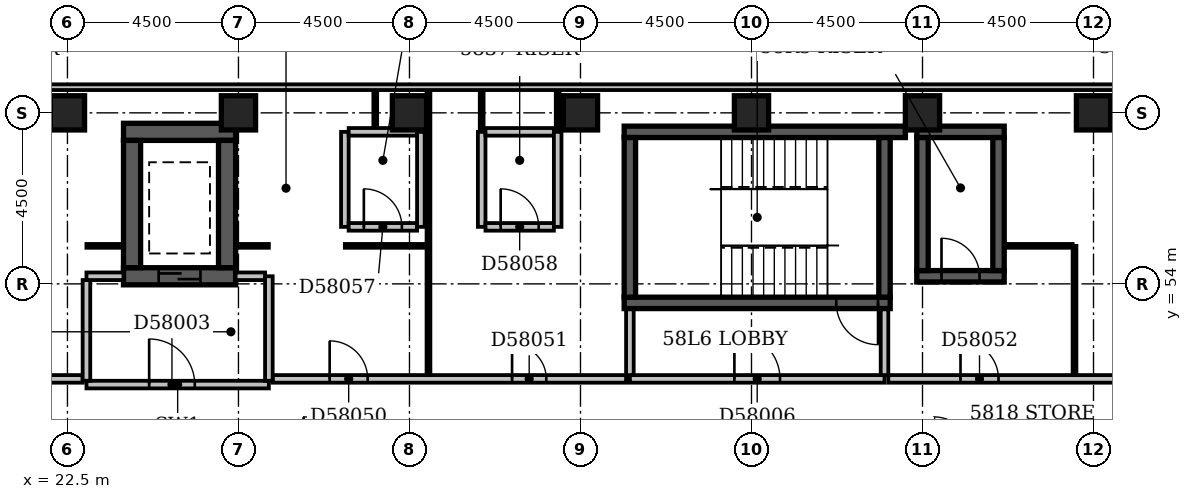
"""IFC4 building model, lengths in metres.
Left out: names, types, materials, properties, quantities, classifications, styles, units other than length and angle.
Written with IfcOpenShell. Run it as: python <this file> out.ifc"""

import sys

from ifc_helpers import new_model, si_unit, direction, frame, frame_2d, origin, origin_2d, place, context, subcontext, project, spatial, rectangle, extrude, element, fill, save


model = new_model("IFC4")
c1 = context("Model", 3, precision=1e-05, world=origin(), true_north=direction((0.0, 1.0)))
c2 = subcontext(c1, "Body", "Model", "MODEL_VIEW")
j1 = project(units=[si_unit("LENGTHUNIT", "METRE"), si_unit("PLANEANGLEUNIT", "RADIAN")], contexts=[c1])
p1 = place(None, origin())
s1 = spatial("IfcSite", under=j1, at=p1, CompositionType="ELEMENT")
p2 = place(p1, origin())
s2 = spatial("IfcBuilding", under=s1, at=p2, CompositionType="ELEMENT")
p3 = place(p2, frame((0.0, 0.0, 225.8)))
s3 = spatial("IfcBuildingStorey", under=s2, at=p3, CompositionType="ELEMENT", Elevation=225.8)
p4 = place(p3, frame((23.975, 54.2, -0.3), z_axis=(0.0, 0.0, 1.0), x_axis=(1.0, 0.0, 0.0)))
e1 = element("IfcWall", 1, at=p4, inside=s3, PredefinedType="SHEAR", context=c2, shape_type="SweptSolid", body=[
    extrude(rectangle(XDim=2.95, YDim=0.45, at=frame_2d((1.475, 0.0))), origin(), (0.0, 0.0, 1.0), 3.6),
])
p5 = place(p4, frame((0.925, 0.0, 0.3)))
e2 = element("IfcOpeningElement", 2, at=p5, cuts=e1, PredefinedType="OPENING", context=c2, shape_type="SweptSolid", body=[
    extrude(rectangle(XDim=1.1, YDim=2.1, at=frame_2d((0.55, 1.05))), frame((0.0, 0.237, 0.0), z_axis=(0.0, -1.0, 0.0), x_axis=(1.0, 0.0, 0.0)), (0.0, 0.0, 1.0), 0.474),
])
p6 = place(p3, frame((23.975, 58.0, -0.3), z_axis=(0.0, 0.0, 1.0), x_axis=(1.0, 0.0, 0.0)))
e3 = element("IfcWall", 3, at=p6, inside=s3, PredefinedType="SHEAR", context=c2, shape_type="SweptSolid", body=[
    extrude(rectangle(XDim=2.95, YDim=0.45, at=frame_2d((1.475, 0.0))), origin(), (0.0, 0.0, 1.0), 3.6),
])
for number, where, z_axis, x_axis in (
    (4, (24.2, 54.425, -0.3), (0.0, 0.0, 1.0), (0.0, 1.0, 0.0)),
    (5, (26.7, 54.425, -0.3), (0.0, 0.0, 1.0), (0.0, 1.0, 0.0)),
):
    element("IfcWall", number, at=place(p3, frame(where, z_axis=z_axis, x_axis=x_axis)), inside=s3, PredefinedType="SHEAR", context=c2, shape_type="SweptSolid", body=[
        extrude(rectangle(XDim=3.35, YDim=0.45, at=frame_2d((1.675, 0.0))), origin(), (0.0, 0.0, 1.0), 3.6),
    ])
p7 = place(p3, frame((37.15, 53.5, -0.3), z_axis=(0.0, 0.0, 1.0), x_axis=(1.0, 0.0, 0.0)))
e6 = element("IfcWall", 6, at=p7, inside=s3, PredefinedType="SHEAR", context=c2, shape_type="SweptSolid", body=[
    extrude(rectangle(XDim=7.0, YDim=0.3, at=frame_2d((3.5, 0.0))), origin(), (0.0, 0.0, 1.0), 3.6),
])
p8 = place(p7, frame((5.58, 0.0, 0.3)))
e7 = element("IfcOpeningElement", 7, at=p8, cuts=e6, PredefinedType="OPENING", context=c2, shape_type="SweptSolid", body=[
    extrude(rectangle(XDim=1.1, YDim=2.1, at=frame_2d((0.55, 1.05))), frame((0.0, 0.162, 0.0), z_axis=(0.0, -1.0, 0.0), x_axis=(1.0, 0.0, 0.0)), (0.0, 0.0, 1.0), 0.324),
])
p9 = place(p3, frame((37.15, 58.0, -0.3), z_axis=(0.0, 0.0, 1.0), x_axis=(1.0, 0.0, 0.0)))
e8 = element("IfcWall", 8, at=p9, inside=s3, PredefinedType="SHEAR", context=c2, shape_type="SweptSolid", body=[
    extrude(rectangle(XDim=7.4, YDim=0.3, at=frame_2d((3.7, 0.0))), origin(), (0.0, 0.0, 1.0), 3.6),
])
for number, where, z_axis, x_axis in (
    (9, (37.3, 53.65, -0.3), (0.0, 0.0, 1.0), (0.0, 1.0, 0.0)),
    (10, (44.0, 53.65, -0.3), (0.0, 0.0, 1.0), (0.0, 1.0, 0.0)),
):
    element("IfcWall", number, at=place(p3, frame(where, z_axis=z_axis, x_axis=x_axis)), inside=s3, PredefinedType="SHEAR", context=c2, shape_type="SweptSolid", body=[
        extrude(rectangle(XDim=4.2, YDim=0.3, at=frame_2d((2.1, 0.0))), origin(), (0.0, 0.0, 1.0), 3.6),
    ])
p10 = place(p3, frame((44.85, 54.2, -0.3), z_axis=(0.0, 0.0, 1.0), x_axis=(1.0, 0.0, 0.0)))
e11 = element("IfcWall", 11, at=p10, inside=s3, PredefinedType="SHEAR", context=c2, shape_type="SweptSolid", body=[
    extrude(rectangle(XDim=2.3, YDim=0.3, at=frame_2d((1.15, 0.0))), origin(), (0.0, 0.0, 1.0), 3.6),
])
p11 = place(p10, frame((0.65, 0.0, 0.3)))
e12 = element("IfcOpeningElement", 12, at=p11, cuts=e11, PredefinedType="OPENING", context=c2, shape_type="SweptSolid", body=[
    extrude(rectangle(XDim=1.0, YDim=2.1, at=frame_2d((0.5, 1.05))), frame((0.0, 0.162, 0.0), z_axis=(0.0, -1.0, 0.0), x_axis=(1.0, 0.0, 0.0)), (0.0, 0.0, 1.0), 0.324),
])
p12 = place(p3, frame((44.85, 58.0, -0.3), z_axis=(0.0, 0.0, 1.0), x_axis=(1.0, 0.0, 0.0)))
e13 = element("IfcWall", 13, at=p12, inside=s3, PredefinedType="SHEAR", context=c2, shape_type="SweptSolid", body=[
    extrude(rectangle(XDim=2.3, YDim=0.3, at=frame_2d((1.15, 0.0))), origin(), (0.0, 0.0, 1.0), 3.6),
])
for number, where, z_axis, x_axis in (
    (14, (45.0, 54.35, -0.3), (0.0, 0.0, 1.0), (0.0, 1.0, 0.0)),
    (15, (47.0, 54.35, -0.3), (0.0, 0.0, 1.0), (0.0, 1.0, 0.0)),
):
    element("IfcWall", number, at=place(p3, frame(where, z_axis=z_axis, x_axis=x_axis)), inside=s3, PredefinedType="SHEAR", context=c2, shape_type="SweptSolid", body=[
        extrude(rectangle(XDim=3.5, YDim=0.3, at=frame_2d((1.75, 0.0))), origin(), (0.0, 0.0, 1.0), 3.6),
    ])
for number, where, z_axis, x_axis in (
    (16, (22.5, 58.5, -0.3), (0.0, 0.0, 1.0), (1.0, 0.0, 0.0)),
    (17, (27.0, 58.5, -0.3), (0.0, 0.0, 1.0), (1.0, 0.0, 0.0)),
    (18, (31.5, 58.5, -0.3), (0.0, 0.0, 1.0), (1.0, 0.0, 0.0)),
    (19, (36.0, 58.5, -0.3), (0.0, 0.0, 1.0), (1.0, 0.0, 0.0)),
    (20, (40.5, 58.5, -0.3), (0.0, 0.0, 1.0), (1.0, 0.0, 0.0)),
    (21, (45.0, 58.5, -0.3), (0.0, 0.0, 1.0), (1.0, 0.0, 0.0)),
    (22, (49.5, 58.5, -0.3), (0.0, 0.0, 1.0), (1.0, 0.0, 0.0)),
):
    element("IfcColumn", number, at=place(p3, frame(where, z_axis=z_axis, x_axis=x_axis)), inside=s3, PredefinedType="COLUMN", context=c2, shape_type="SweptSolid", body=[
        extrude(rectangle(XDim=0.9, YDim=0.9, at=origin_2d()), origin(), (0.0, 0.0, 1.0), 3.6),
    ])
p13 = place(p3, frame((50.1, 59.175, 0.0), z_axis=(0.0, 0.0, 1.0), x_axis=(-1.0, 0.0, 0.0)))
e23 = element("IfcWall", 23, at=p13, inside=s3, PredefinedType="STANDARD", context=c2, shape_type="SweptSolid", body=[
    extrude(rectangle(XDim=50.85, YDim=0.15, at=frame_2d((25.425, 0.0))), origin(), (0.0, 0.0, 1.0), 2.7),
])
p14 = place(p3, frame((23.0, 51.35, 0.0), z_axis=(0.0, 0.0, 1.0), x_axis=(1.0, 0.0, 0.0)))
e24 = element("IfcWall", 24, at=p14, inside=s3, PredefinedType="PARTITIONING", context=c2, shape_type="SweptSolid", body=[
    extrude(rectangle(XDim=4.8, YDim=0.2, at=frame_2d((2.4, 0.0))), origin(), (0.0, 0.0, 1.0), 3.3),
])
p15 = place(p14, frame((1.65, 0.0, 0.0)))
e25 = element("IfcOpeningElement", 25, at=p15, cuts=e24, PredefinedType="OPENING", context=c2, shape_type="SweptSolid", body=[
    extrude(rectangle(XDim=1.2, YDim=2.1, at=frame_2d((0.6, 1.05))), frame((0.0, 0.112, 0.0), z_axis=(0.0, -1.0, 0.0), x_axis=(1.0, 0.0, 0.0)), (0.0, 0.0, 1.0), 0.224),
])
p16 = place(p3, frame((27.8, 51.45, 0.0), z_axis=(0.0, 0.0, 1.0), x_axis=(0.0, 1.0, 0.0)))
e26 = element("IfcWall", 26, at=p16, inside=s3, PredefinedType="PARTITIONING", context=c2, shape_type="SweptSolid", body=[
    extrude(rectangle(XDim=2.75, YDim=0.2, at=frame_2d((1.375, 0.0))), origin(), (0.0, 0.0, 1.0), 3.3),
])
p17 = place(p3, frame((23.0, 54.2, 0.0), z_axis=(0.0, 0.0, 1.0), x_axis=(1.0, 0.0, 0.0)))
e27 = element("IfcWall", 27, at=p17, inside=s3, PredefinedType="PARTITIONING", context=c2, shape_type="SweptSolid", body=[
    extrude(rectangle(XDim=0.975, YDim=0.2, at=frame_2d((0.488, 0.0))), origin(), (0.0, 0.0, 1.0), 3.3),
])
p18 = place(p3, frame((26.925, 54.2, 0.0), z_axis=(0.0, 0.0, 1.0), x_axis=(1.0, 0.0, 0.0)))
e28 = element("IfcWall", 28, at=p18, inside=s3, PredefinedType="PARTITIONING", context=c2, shape_type="SweptSolid", body=[
    extrude(rectangle(XDim=0.775, YDim=0.2, at=frame_2d((0.387, 0.0))), origin(), (0.0, 0.0, 1.0), 3.3),
])
p19 = place(p3, frame((23.0, 51.45, 0.0), z_axis=(0.0, 0.0, 1.0), x_axis=(0.0, 1.0, 0.0)))
e29 = element("IfcWall", 29, at=p19, inside=s3, PredefinedType="PARTITIONING", context=c2, shape_type="SweptSolid", body=[
    extrude(rectangle(XDim=2.65, YDim=0.2, at=frame_2d((1.325, 0.0))), origin(), (0.0, 0.0, 1.0), 3.3),
])
p20 = place(p3, frame((37.3, 51.5, 0.0), z_axis=(0.0, 0.0, 1.0), x_axis=(1.0, 0.0, 0.0)))
e30 = element("IfcWall", 30, at=p20, inside=s3, PredefinedType="PARTITIONING", context=c2, shape_type="SweptSolid", body=[
    extrude(rectangle(XDim=6.7, YDim=0.2, at=frame_2d((3.35, 0.0))), origin(), (0.0, 0.0, 1.0), 3.3),
])
p21 = place(p20, frame((2.75, 0.0, 0.0)))
e31 = element("IfcOpeningElement", 31, at=p21, cuts=e30, PredefinedType="OPENING", context=c2, shape_type="SweptSolid", body=[
    extrude(rectangle(XDim=1.2, YDim=2.1, at=frame_2d((0.6, 1.05))), frame((0.0, 0.112, 0.0), z_axis=(0.0, -1.0, 0.0), x_axis=(1.0, 0.0, 0.0)), (0.0, 0.0, 1.0), 0.224),
])
for number, where, z_axis, x_axis in (
    (32, (44.0, 51.6, 0.0), (0.0, 0.0, 1.0), (0.0, 1.0, 0.0)),
    (33, (37.3, 51.6, 0.0), (0.0, 0.0, 1.0), (0.0, 1.0, 0.0)),
):
    element("IfcWall", number, at=place(p3, frame(where, z_axis=z_axis, x_axis=x_axis)), inside=s3, PredefinedType="PARTITIONING", context=c2, shape_type="SweptSolid", body=[
        extrude(rectangle(XDim=1.73, YDim=0.2, at=frame_2d((0.865, 0.0))), origin(), (0.0, 0.0, 1.0), 3.3),
    ])
p22 = place(p3, frame((7.6, 51.5, 0.0), z_axis=(0.0, 0.0, 1.0), x_axis=(1.0, 0.0, 0.0)))
e34 = element("IfcWall", 34, at=p22, inside=s3, PredefinedType="PARTITIONING", context=c2, shape_type="SweptSolid", body=[
    extrude(rectangle(XDim=15.3, YDim=0.2, at=frame_2d((7.65, 0.0))), origin(), (0.0, 0.0, 1.0), 3.3),
])
p23 = place(p22, frame((3.55, 0.0, 0.0)))
e35 = element("IfcOpeningElement", 35, at=p23, cuts=e34, PredefinedType="OPENING", context=c2, shape_type="SweptSolid", body=[
    extrude(rectangle(XDim=0.9, YDim=2.1, at=frame_2d((0.45, 1.05))), frame((0.0, 0.112, 0.0), z_axis=(0.0, -1.0, 0.0), x_axis=(1.0, 0.0, 0.0)), (0.0, 0.0, 1.0), 0.224),
])
p24 = place(p22, frame((11.3, 0.0, 0.0)))
e36 = element("IfcOpeningElement", 36, at=p24, cuts=e34, PredefinedType="OPENING", context=c2, shape_type="SweptSolid", body=[
    extrude(rectangle(XDim=0.9, YDim=2.1, at=frame_2d((0.45, 1.05))), frame((0.0, 0.112, 0.0), z_axis=(0.0, -1.0, 0.0), x_axis=(1.0, 0.0, 0.0)), (0.0, 0.0, 1.0), 0.224),
])
p25 = place(p3, frame((27.9, 51.5, 0.0), z_axis=(0.0, 0.0, 1.0), x_axis=(1.0, 0.0, 0.0)))
e37 = element("IfcWall", 37, at=p25, inside=s3, PredefinedType="PARTITIONING", context=c2, shape_type="SweptSolid", body=[
    extrude(rectangle(XDim=9.3, YDim=0.2, at=frame_2d((4.65, 0.0))), origin(), (0.0, 0.0, 1.0), 3.3),
])
p26 = place(p25, frame((1.5, 0.0, 0.0)))
e38 = element("IfcOpeningElement", 38, at=p26, cuts=e37, PredefinedType="OPENING", context=c2, shape_type="SweptSolid", body=[
    extrude(rectangle(XDim=1.0, YDim=2.1, at=frame_2d((0.5, 1.05))), frame((0.0, 0.112, 0.0), z_axis=(0.0, -1.0, 0.0), x_axis=(1.0, 0.0, 0.0)), (0.0, 0.0, 1.0), 0.224),
])
p27 = place(p25, frame((6.3, 0.0, 0.0)))
e39 = element("IfcOpeningElement", 39, at=p27, cuts=e37, PredefinedType="OPENING", context=c2, shape_type="SweptSolid", body=[
    extrude(rectangle(XDim=0.9, YDim=2.1, at=frame_2d((0.45, 1.05))), frame((0.0, 0.112, 0.0), z_axis=(0.0, -1.0, 0.0), x_axis=(1.0, 0.0, 0.0)), (0.0, 0.0, 1.0), 0.224),
])
p28 = place(p3, frame((44.1, 51.5, 0.0), z_axis=(0.0, 0.0, 1.0), x_axis=(1.0, 0.0, 0.0)))
e40 = element("IfcWall", 40, at=p28, inside=s3, PredefinedType="PARTITIONING", context=c2, shape_type="SweptSolid", body=[
    extrude(rectangle(XDim=10.5, YDim=0.2, at=frame_2d((5.25, 0.0))), origin(), (0.0, 0.0, 1.0), 3.3),
])
p29 = place(p28, frame((1.9, 0.0, 0.0)))
e41 = element("IfcOpeningElement", 41, at=p29, cuts=e40, PredefinedType="OPENING", context=c2, shape_type="SweptSolid", body=[
    extrude(rectangle(XDim=1.0, YDim=2.1, at=frame_2d((0.5, 1.05))), frame((0.0, 0.112, 0.0), z_axis=(0.0, -1.0, 0.0), x_axis=(1.0, 0.0, 0.0)), (0.0, 0.0, 1.0), 0.224),
])
p30 = place(p28, frame((6.9, 0.0, 0.0)))
e42 = element("IfcOpeningElement", 42, at=p30, cuts=e40, PredefinedType="OPENING", context=c2, shape_type="SweptSolid", body=[
    extrude(rectangle(XDim=1.0, YDim=2.1, at=frame_2d((0.5, 1.05))), frame((0.0, 0.112, 0.0), z_axis=(0.0, -1.0, 0.0), x_axis=(1.0, 0.0, 0.0)), (0.0, 0.0, 1.0), 0.224),
])
p31 = place(p3, frame((32.0, 51.6, 0.0), z_axis=(0.0, 0.0, 1.0), x_axis=(0.0, 1.0, 0.0)))
e43 = element("IfcWall", 43, at=p31, inside=s3, PredefinedType="PARTITIONING", context=c2, shape_type="SweptSolid", body=[
    extrude(rectangle(XDim=7.5, YDim=0.1, at=frame_2d((3.75, 0.0))), origin(), (0.0, 0.0, 1.0), 3.3),
])
p32 = place(p3, frame((49.0, 51.6, 0.0), z_axis=(0.0, 0.0, 1.0), x_axis=(0.0, 1.0, 0.0)))
e44 = element("IfcWall", 44, at=p32, inside=s3, PredefinedType="PARTITIONING", context=c2, shape_type="SweptSolid", body=[
    extrude(rectangle(XDim=3.4, YDim=0.1, at=frame_2d((1.7, 0.0))), origin(), (0.0, 0.0, 1.0), 3.3),
])
p33 = place(p3, frame((23.0, 55.0, 0.0), z_axis=(0.0, 0.0, 1.0), x_axis=(1.0, 0.0, 0.0)))
e45 = element("IfcWall", 45, at=p33, inside=s3, PredefinedType="PARTITIONING", context=c2, shape_type="SweptSolid", body=[
    extrude(rectangle(XDim=0.975, YDim=0.1, at=frame_2d((0.488, 0.0))), origin(), (0.0, 0.0, 1.0), 3.3),
])
p34 = place(p3, frame((26.925, 55.0, 0.0), z_axis=(0.0, 0.0, 1.0), x_axis=(1.0, 0.0, 0.0)))
e46 = element("IfcWall", 46, at=p34, inside=s3, PredefinedType="PARTITIONING", context=c2, shape_type="SweptSolid", body=[
    extrude(rectangle(XDim=0.875, YDim=0.1, at=frame_2d((0.438, 0.0))), origin(), (0.0, 0.0, 1.0), 3.3),
])
p35 = place(p3, frame((29.8, 55.0, 0.0), z_axis=(0.0, 0.0, 1.0), x_axis=(1.0, 0.0, 0.0)))
e47 = element("IfcWall", 47, at=p35, inside=s3, PredefinedType="PARTITIONING", context=c2, shape_type="SweptSolid", body=[
    extrude(rectangle(XDim=2.15, YDim=0.1, at=frame_2d((1.075, 0.0))), origin(), (0.0, 0.0, 1.0), 3.3),
])
p36 = place(p3, frame((47.15, 55.0, 0.0), z_axis=(0.0, 0.0, 1.0), x_axis=(1.0, 0.0, 0.0)))
e48 = element("IfcWall", 48, at=p36, inside=s3, PredefinedType="PARTITIONING", context=c2, shape_type="SweptSolid", body=[
    extrude(rectangle(XDim=1.8, YDim=0.1, at=frame_2d((0.9, 0.0))), origin(), (0.0, 0.0, 1.0), 3.3),
])
p37 = place(p3, frame((29.8, 55.5, 0.0), z_axis=(0.0, 0.0, 1.0), x_axis=(0.0, 1.0, 0.0)))
e49 = element("IfcWall", 49, at=p37, inside=s3, PredefinedType="PARTITIONING", context=c2, shape_type="SweptSolid", body=[
    extrude(rectangle(XDim=2.5, YDim=0.2, at=frame_2d((1.25, 0.0))), origin(), (0.0, 0.0, 1.0), 3.3),
])
p38 = place(p3, frame((29.9, 55.5, 0.0), z_axis=(0.0, 0.0, 1.0), x_axis=(1.0, 0.0, 0.0)))
e50 = element("IfcWall", 50, at=p38, inside=s3, PredefinedType="PARTITIONING", context=c2, shape_type="SweptSolid", body=[
    extrude(rectangle(XDim=1.8, YDim=0.2, at=frame_2d((0.9, 0.0))), origin(), (0.0, 0.0, 1.0), 3.3),
])
p39 = place(p38, frame((0.4, 0.0, 0.0)))
e51 = element("IfcOpeningElement", 51, at=p39, cuts=e50, PredefinedType="OPENING", context=c2, shape_type="SweptSolid", body=[
    extrude(rectangle(XDim=1.0, YDim=2.1, at=frame_2d((0.5, 1.05))), frame((0.0, 0.112, 0.0), z_axis=(0.0, -1.0, 0.0), x_axis=(1.0, 0.0, 0.0)), (0.0, 0.0, 1.0), 0.224),
])
for number, where, z_axis, x_axis in (
    (52, (31.8, 55.5, 0.0), (0.0, 0.0, 1.0), (0.0, 1.0, 0.0)),
    (53, (33.4, 55.5, 0.0), (0.0, 0.0, 1.0), (0.0, 1.0, 0.0)),
):
    element("IfcWall", number, at=place(p3, frame(where, z_axis=z_axis, x_axis=x_axis)), inside=s3, PredefinedType="PARTITIONING", context=c2, shape_type="SweptSolid", body=[
        extrude(rectangle(XDim=2.5, YDim=0.2, at=frame_2d((1.25, 0.0))), origin(), (0.0, 0.0, 1.0), 3.3),
    ])
p40 = place(p3, frame((33.5, 55.5, 0.0), z_axis=(0.0, 0.0, 1.0), x_axis=(1.0, 0.0, 0.0)))
e54 = element("IfcWall", 54, at=p40, inside=s3, PredefinedType="PARTITIONING", context=c2, shape_type="SweptSolid", body=[
    extrude(rectangle(XDim=1.8, YDim=0.2, at=frame_2d((0.9, 0.0))), origin(), (0.0, 0.0, 1.0), 3.3),
])
p41 = place(p40, frame((0.4, 0.0, 0.0)))
e55 = element("IfcOpeningElement", 55, at=p41, cuts=e54, PredefinedType="OPENING", context=c2, shape_type="SweptSolid", body=[
    extrude(rectangle(XDim=1.0, YDim=2.1, at=frame_2d((0.5, 1.05))), frame((0.0, 0.112, 0.0), z_axis=(0.0, -1.0, 0.0), x_axis=(1.0, 0.0, 0.0)), (0.0, 0.0, 1.0), 0.224),
])
p42 = place(p3, frame((35.4, 55.5, 0.0), z_axis=(0.0, 0.0, 1.0), x_axis=(0.0, 1.0, 0.0)))
e56 = element("IfcWall", 56, at=p42, inside=s3, PredefinedType="PARTITIONING", context=c2, shape_type="SweptSolid", body=[
    extrude(rectangle(XDim=2.5, YDim=0.2, at=frame_2d((1.25, 0.0))), origin(), (0.0, 0.0, 1.0), 2.4),
])
p43 = place(p3, frame((29.9, 58.0, 0.0), z_axis=(0.0, 0.0, 1.0), x_axis=(1.0, 0.0, 0.0)))
e57 = element("IfcWall", 57, at=p43, inside=s3, PredefinedType="PARTITIONING", context=c2, shape_type="SweptSolid", body=[
    extrude(rectangle(XDim=1.8, YDim=0.2, at=frame_2d((0.9, 0.0))), origin(), (0.0, 0.0, 1.0), 3.3),
])
p44 = place(p3, frame((33.4, 58.0, 0.0), z_axis=(0.0, 0.0, 1.0), x_axis=(0.0, 1.0, 0.0)))
e58 = element("IfcWall", 58, at=p44, inside=s3, PredefinedType="PARTITIONING", context=c2, shape_type="SweptSolid", body=[
    extrude(rectangle(XDim=1.1, YDim=0.1, at=frame_2d((0.55, 0.0))), origin(), (0.0, 0.0, 1.0), 3.3),
])
p45 = place(p3, frame((33.5, 58.0, 0.0), z_axis=(0.0, 0.0, 1.0), x_axis=(1.0, 0.0, 0.0)))
e59 = element("IfcWall", 59, at=p45, inside=s3, PredefinedType="PARTITIONING", context=c2, shape_type="SweptSolid", body=[
    extrude(rectangle(XDim=1.8, YDim=0.2, at=frame_2d((0.9, 0.0))), origin(), (0.0, 0.0, 1.0), 3.3),
])
p46 = place(p3, frame((35.4, 58.0, 0.0), z_axis=(0.0, 0.0, 1.0), x_axis=(0.0, 1.0, 0.0)))
e60 = element("IfcWall", 60, at=p46, inside=s3, PredefinedType="PARTITIONING", context=c2, shape_type="SweptSolid", body=[
    extrude(rectangle(XDim=1.1, YDim=0.1, at=frame_2d((0.55, 0.0))), origin(), (0.0, 0.0, 1.0), 2.4),
])
p47 = place(p3, frame((30.6, 58.1, 0.0), z_axis=(0.0, 0.0, 1.0), x_axis=(0.0, 1.0, 0.0)))
e61 = element("IfcWall", 61, at=p47, inside=s3, PredefinedType="PARTITIONING", context=c2, shape_type="SweptSolid", body=[
    extrude(rectangle(XDim=1.0, YDim=0.1, at=frame_2d((0.5, 0.0))), origin(), (0.0, 0.0, 1.0), 3.3),
])
p48 = place(p15, origin())
e62 = element("IfcDoor", 62, at=p48, inside=s3, OperationType="SINGLE_SWING_LEFT", PredefinedType="DOOR", context=c2, shape_type="SweptSolid", body=[
    extrude(rectangle(XDim=1.2, YDim=2.1, at=frame_2d((0.6, 1.05))), frame((0.0, 0.025, 0.0), z_axis=(0.0, -1.0, 0.0), x_axis=(1.0, 0.0, 0.0)), (0.0, 0.0, 1.0), 0.05),
])
fill(e25, e62)
p49 = place(p5, origin())
e63 = element("IfcDoor", 63, at=p49, inside=s3, OperationType="SLIDING_TO_LEFT", PredefinedType="DOOR", context=c2, shape_type="SweptSolid", body=[
    extrude(rectangle(XDim=1.1, YDim=2.1, at=frame_2d((0.55, 1.05))), frame((0.0, 0.025, 0.0), z_axis=(0.0, -1.0, 0.0), x_axis=(1.0, 0.0, 0.0)), (0.0, 0.0, 1.0), 0.05),
])
fill(e2, e63)
p50 = place(p21, origin())
e64 = element("IfcDoor", 64, at=p50, inside=s3, OperationType="SINGLE_SWING_LEFT", PredefinedType="DOOR", context=c2, shape_type="SweptSolid", body=[
    extrude(rectangle(XDim=1.2, YDim=2.1, at=frame_2d((0.6, 1.05))), frame((0.0, 0.025, 0.0), z_axis=(0.0, -1.0, 0.0), x_axis=(1.0, 0.0, 0.0)), (0.0, 0.0, 1.0), 0.05),
])
fill(e31, e64)
p51 = place(p11, origin())
e65 = element("IfcDoor", 65, at=p51, inside=s3, OperationType="SINGLE_SWING_LEFT", PredefinedType="DOOR", context=c2, shape_type="SweptSolid", body=[
    extrude(rectangle(XDim=1.0, YDim=2.1, at=frame_2d((0.5, 1.05))), frame((0.0, 0.025, 0.0), z_axis=(0.0, -1.0, 0.0), x_axis=(1.0, 0.0, 0.0)), (0.0, 0.0, 1.0), 0.05),
])
fill(e12, e65)
p52 = place(p8, origin())
e66 = element("IfcDoor", 66, at=p52, inside=s3, OperationType="SINGLE_SWING_RIGHT", PredefinedType="DOOR", context=c2, shape_type="SweptSolid", body=[
    extrude(rectangle(XDim=1.1, YDim=2.1, at=frame_2d((0.55, 1.05))), frame((0.0, 0.025, 0.0), z_axis=(0.0, -1.0, 0.0), x_axis=(1.0, 0.0, 0.0)), (0.0, 0.0, 1.0), 0.05),
])
fill(e7, e66)
p53 = place(p26, origin())
e67 = element("IfcDoor", 67, at=p53, inside=s3, OperationType="SINGLE_SWING_LEFT", PredefinedType="DOOR", context=c2, shape_type="SweptSolid", body=[
    extrude(rectangle(XDim=1.0, YDim=2.1, at=frame_2d((0.5, 1.05))), frame((0.0, 0.025, 0.0), z_axis=(0.0, -1.0, 0.0), x_axis=(1.0, 0.0, 0.0)), (0.0, 0.0, 1.0), 0.05),
])
fill(e38, e67)
p54 = place(p27, origin())
e68 = element("IfcDoor", 68, at=p54, inside=s3, OperationType="SINGLE_SWING_LEFT", PredefinedType="DOOR", context=c2, shape_type="SweptSolid", body=[
    extrude(rectangle(XDim=0.9, YDim=2.1, at=frame_2d((0.45, 1.05))), frame((0.0, 0.025, 0.0), z_axis=(0.0, -1.0, 0.0), x_axis=(1.0, 0.0, 0.0)), (0.0, 0.0, 1.0), 0.05),
])
fill(e39, e68)
p55 = place(p29, origin())
e69 = element("IfcDoor", 69, at=p55, inside=s3, OperationType="SINGLE_SWING_LEFT", PredefinedType="DOOR", context=c2, shape_type="SweptSolid", body=[
    extrude(rectangle(XDim=1.0, YDim=2.1, at=frame_2d((0.5, 1.05))), frame((0.0, 0.025, 0.0), z_axis=(0.0, -1.0, 0.0), x_axis=(1.0, 0.0, 0.0)), (0.0, 0.0, 1.0), 0.05),
])
fill(e41, e69)
p56 = place(p39, origin())
e70 = element("IfcDoor", 70, at=p56, inside=s3, OperationType="SINGLE_SWING_LEFT", PredefinedType="DOOR", context=c2, shape_type="SweptSolid", body=[
    extrude(rectangle(XDim=1.0, YDim=2.1, at=frame_2d((0.5, 1.05))), frame((0.0, 0.025, 0.0), z_axis=(0.0, -1.0, 0.0), x_axis=(1.0, 0.0, 0.0)), (0.0, 0.0, 1.0), 0.05),
])
fill(e51, e70)
p57 = place(p41, origin())
e71 = element("IfcDoor", 71, at=p57, inside=s3, OperationType="SINGLE_SWING_LEFT", PredefinedType="DOOR", context=c2, shape_type="SweptSolid", body=[
    extrude(rectangle(XDim=1.0, YDim=2.1, at=frame_2d((0.5, 1.05))), frame((0.0, 0.025, 0.0), z_axis=(0.0, -1.0, 0.0), x_axis=(1.0, 0.0, 0.0)), (0.0, 0.0, 1.0), 0.05),
])
fill(e55, e71)
save(model, sys.argv[1])
